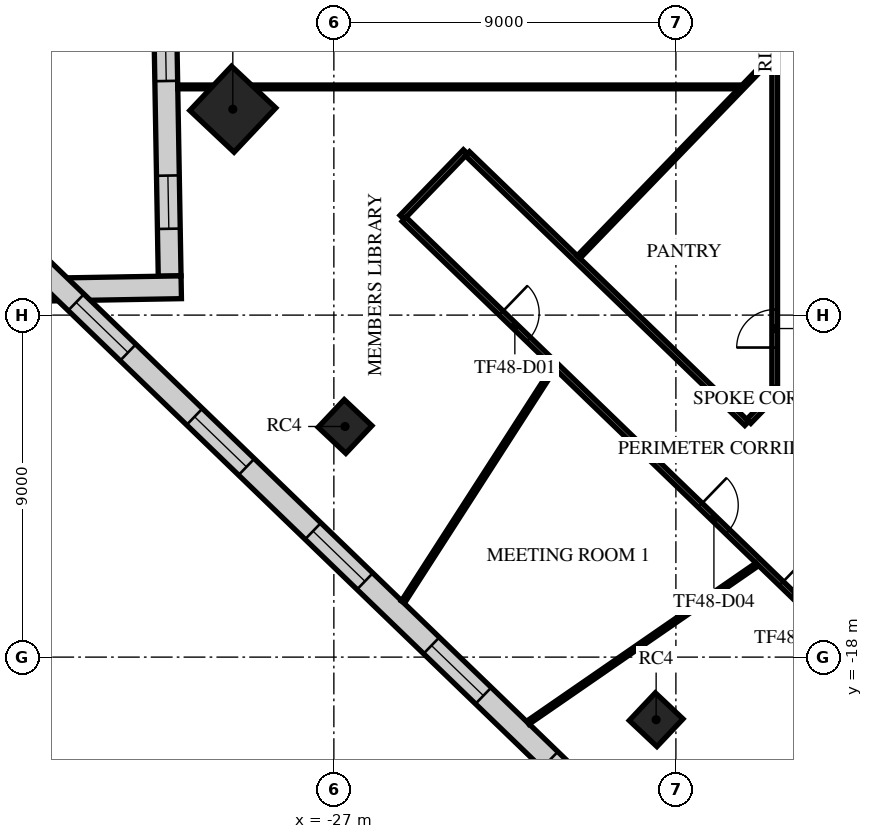
"""IFC4 building model, lengths in metres.
Left out: names, types, materials, properties, quantities, classifications, styles, units other than length and angle.
Written with IfcOpenShell. Run it as: python <this file> out.ifc"""

import sys

from ifc_helpers import new_model, si_unit, direction, frame, frame_2d, origin, origin_2d, place, context, subcontext, project, spatial, rectangle, extrude, element, fill, save


model = new_model("IFC4")
c1 = context("Model", 3, precision=1e-05, world=origin(), true_north=direction((0.0, 1.0)))
c2 = subcontext(c1, "Body", "Model", "MODEL_VIEW")
j1 = project(units=[si_unit("LENGTHUNIT", "METRE"), si_unit("PLANEANGLEUNIT", "RADIAN")], contexts=[c1])
p1 = place(None, origin())
s1 = spatial("IfcSite", under=j1, at=p1, CompositionType="ELEMENT")
p2 = place(p1, origin())
s2 = spatial("IfcBuilding", under=s1, at=p2, CompositionType="ELEMENT")
p3 = place(p2, frame((0.0, 0.0, 205.3)))
s3 = spatial("IfcBuildingStorey", under=s2, at=p3, CompositionType="ELEMENT", Elevation=205.3)
p4 = place(p3, frame((-29.659, -3.582, 0.0), z_axis=(0.0, 0.0, 1.0), x_axis=(0.685916152371, 0.727680583715, 0.0)))
e1 = element("IfcColumn", 1, at=p4, inside=s3, PredefinedType="COLUMN", context=c2, shape_type="SweptSolid", body=[
    extrude(rectangle(XDim=1.6, YDim=1.6, at=origin_2d()), origin(), (0.0, 0.0, 1.0), 4.0),
])
for number, where, z_axis, x_axis in (
    (2, (-26.706, -11.931, 0.0), (0.0, 0.0, 1.0), (0.686, 0.728, 0.0)),
    (3, (-18.52, -19.647, 0.0), (0.0, 0.0, 1.0), (0.686, 0.728, 0.0)),
):
    element("IfcColumn", number, at=place(p3, frame(where, z_axis=z_axis, x_axis=x_axis)), inside=s3, PredefinedType="COLUMN", context=c2, shape_type="SweptSolid", body=[
        extrude(rectangle(XDim=1.0, YDim=1.0, at=origin_2d()), origin(), (0.0, 0.0, 1.0), 4.0),
    ])
p5 = place(p3, frame((-31.457, -0.196, 0.0), z_axis=(0.0, 0.0, 1.0), x_axis=(0.017451978485, -0.999847702626, 0.0)))
e4 = element("IfcWall", 4, at=p5, inside=s3, PredefinedType="STANDARD", context=c2, shape_type="SweptSolid", body=[
    extrude(rectangle(XDim=7.778, YDim=0.6, at=frame_2d((3.889, 0.0))), origin(), (0.0, 0.0, 1.0), 3.62),
])
p6 = place(p5, frame((1.244, 0.0, 0.9)))
e5 = element("IfcOpeningElement", 5, at=p6, cuts=e4, PredefinedType="OPENING", context=c2, shape_type="SweptSolid", body=[
    extrude(rectangle(XDim=1.4, YDim=2.1, at=frame_2d((0.7, 1.05))), frame((0.0, 0.31, 0.0), z_axis=(0.0, -1.0, 0.0), x_axis=(1.0, 0.0, 0.0)), (0.0, 0.0, 1.0), 0.62),
])
p7 = place(p5, frame((5.134, 0.0, 0.9)))
e6 = element("IfcOpeningElement", 6, at=p7, cuts=e4, PredefinedType="OPENING", context=c2, shape_type="SweptSolid", body=[
    extrude(rectangle(XDim=1.4, YDim=2.1, at=frame_2d((0.7, 1.05))), frame((0.0, 0.31, 0.0), z_axis=(0.0, -1.0, 0.0), x_axis=(1.0, 0.0, 0.0)), (0.0, 0.0, 1.0), 0.62),
])
p8 = place(p3, frame((-31.016, -8.267, 0.0), z_axis=(0.0, 0.0, 1.0), x_axis=(-0.999847642189, -0.017455440681, 0.0)))
e7 = element("IfcWall", 7, at=p8, inside=s3, PredefinedType="STANDARD", context=c2, shape_type="SweptSolid", body=[
    extrude(rectangle(XDim=3.846, YDim=0.6, at=frame_2d((1.923, 0.0))), origin(), (0.0, 0.0, 1.0), 3.62),
])
p9 = place(p3, frame((-34.658, -7.819, 0.0), z_axis=(0.0, 0.0, 1.0), x_axis=(0.719340729741, -0.694657408034, 0.0)))
e8 = element("IfcWall", 8, at=p9, inside=s3, PredefinedType="STANDARD", context=c2, shape_type="SweptSolid", body=[
    extrude(rectangle(XDim=39.0, YDim=0.6, at=frame_2d((19.5, 0.0))), origin(), (0.0, 0.0, 1.0), 3.62),
])
p10 = place(p9, frame((1.217, 0.0, 0.9)))
e9 = element("IfcOpeningElement", 9, at=p10, cuts=e8, PredefinedType="OPENING", context=c2, shape_type="SweptSolid", body=[
    extrude(rectangle(XDim=1.9, YDim=2.1, at=frame_2d((0.95, 1.05))), frame((0.0, 0.31, 0.0), z_axis=(0.0, -1.0, 0.0), x_axis=(1.0, 0.0, 0.0)), (0.0, 0.0, 1.0), 0.62),
])
p11 = place(p9, frame((5.55, 0.0, 0.9)))
e10 = element("IfcOpeningElement", 10, at=p11, cuts=e8, PredefinedType="OPENING", context=c2, shape_type="SweptSolid", body=[
    extrude(rectangle(XDim=1.9, YDim=2.1, at=frame_2d((0.95, 1.05))), frame((0.0, 0.31, 0.0), z_axis=(0.0, -1.0, 0.0), x_axis=(1.0, 0.0, 0.0)), (0.0, 0.0, 1.0), 0.62),
])
p12 = place(p9, frame((9.883, 0.0, 0.9)))
e11 = element("IfcOpeningElement", 11, at=p12, cuts=e8, PredefinedType="OPENING", context=c2, shape_type="SweptSolid", body=[
    extrude(rectangle(XDim=1.9, YDim=2.1, at=frame_2d((0.95, 1.05))), frame((0.0, 0.31, 0.0), z_axis=(0.0, -1.0, 0.0), x_axis=(1.0, 0.0, 0.0)), (0.0, 0.0, 1.0), 0.62),
])
p13 = place(p9, frame((14.217, 0.0, 0.9)))
e12 = element("IfcOpeningElement", 12, at=p13, cuts=e8, PredefinedType="OPENING", context=c2, shape_type="SweptSolid", body=[
    extrude(rectangle(XDim=1.9, YDim=2.1, at=frame_2d((0.95, 1.05))), frame((0.0, 0.31, 0.0), z_axis=(0.0, -1.0, 0.0), x_axis=(1.0, 0.0, 0.0)), (0.0, 0.0, 1.0), 0.62),
])
p14 = place(p9, frame((18.55, 0.0, 0.9)))
e13 = element("IfcOpeningElement", 13, at=p14, cuts=e8, PredefinedType="OPENING", context=c2, shape_type="SweptSolid", body=[
    extrude(rectangle(XDim=1.9, YDim=2.1, at=frame_2d((0.95, 1.05))), frame((0.0, 0.31, 0.0), z_axis=(0.0, -1.0, 0.0), x_axis=(1.0, 0.0, 0.0)), (0.0, 0.0, 1.0), 0.62),
])
p15 = place(p9, frame((22.883, 0.0, 0.9)))
e14 = element("IfcOpeningElement", 14, at=p15, cuts=e8, PredefinedType="OPENING", context=c2, shape_type="SweptSolid", body=[
    extrude(rectangle(XDim=1.9, YDim=2.1, at=frame_2d((0.95, 1.05))), frame((0.0, 0.31, 0.0), z_axis=(0.0, -1.0, 0.0), x_axis=(1.0, 0.0, 0.0)), (0.0, 0.0, 1.0), 0.62),
])
p16 = place(p9, frame((27.217, 0.0, 0.9)))
e15 = element("IfcOpeningElement", 15, at=p16, cuts=e8, PredefinedType="OPENING", context=c2, shape_type="SweptSolid", body=[
    extrude(rectangle(XDim=1.9, YDim=2.1, at=frame_2d((0.95, 1.05))), frame((0.0, 0.31, 0.0), z_axis=(0.0, -1.0, 0.0), x_axis=(1.0, 0.0, 0.0)), (0.0, 0.0, 1.0), 0.62),
])
p17 = place(p9, frame((31.55, 0.0, 0.9)))
e16 = element("IfcOpeningElement", 16, at=p17, cuts=e8, PredefinedType="OPENING", context=c2, shape_type="SweptSolid", body=[
    extrude(rectangle(XDim=1.9, YDim=2.1, at=frame_2d((0.95, 1.05))), frame((0.0, 0.31, 0.0), z_axis=(0.0, -1.0, 0.0), x_axis=(1.0, 0.0, 0.0)), (0.0, 0.0, 1.0), 0.62),
])
p18 = place(p9, frame((35.883, 0.0, 0.9)))
e17 = element("IfcOpeningElement", 17, at=p18, cuts=e8, PredefinedType="OPENING", context=c2, shape_type="SweptSolid", body=[
    extrude(rectangle(XDim=1.9, YDim=2.1, at=frame_2d((0.95, 1.05))), frame((0.0, 0.31, 0.0), z_axis=(0.0, -1.0, 0.0), x_axis=(1.0, 0.0, 0.0)), (0.0, 0.0, 1.0), 0.62),
])
p19 = place(p3, frame((-25.205, -6.427, 0.0), z_axis=(0.0, 0.0, 1.0), x_axis=(0.694688923552, 0.719310294305, 0.0)))
e18 = element("IfcWall", 18, at=p19, inside=s3, PredefinedType="PARTITIONING", context=c2, shape_type="SweptSolid", body=[
    extrude(rectangle(XDim=2.4, YDim=0.15, at=frame_2d((1.2, 0.0))), origin(), (0.0, 0.0, 1.0), 3.62),
])
p20 = place(p3, frame((-25.151, -6.479, 0.0), z_axis=(0.0, 0.0, 1.0), x_axis=(0.719341269489, -0.694656849106, 0.0)))
e19 = element("IfcWall", 19, at=p20, inside=s3, PredefinedType="PARTITIONING", context=c2, shape_type="SweptSolid", body=[
    extrude(rectangle(XDim=27.258, YDim=0.15, at=frame_2d((13.629, 0.0))), origin(), (0.0, 0.0, 1.0), 3.17),
])
p21 = place(p20, frame((3.55, 0.0, 0.0)))
e20 = element("IfcOpeningElement", 20, at=p21, cuts=e19, PredefinedType="OPENING", context=c2, shape_type="SweptSolid", body=[
    extrude(rectangle(XDim=1.0, YDim=2.1, at=frame_2d((0.5, 1.05))), frame((0.0, 0.085, 0.0), z_axis=(0.0, -1.0, 0.0), x_axis=(1.0, 0.0, 0.0)), (0.0, 0.0, 1.0), 0.17),
])
p22 = place(p20, frame((10.832, 0.0, 0.0)))
e21 = element("IfcOpeningElement", 21, at=p22, cuts=e19, PredefinedType="OPENING", context=c2, shape_type="SweptSolid", body=[
    extrude(rectangle(XDim=1.0, YDim=2.1, at=frame_2d((0.5, 1.05))), frame((0.0, 0.085, 0.0), z_axis=(0.0, -1.0, 0.0), x_axis=(1.0, 0.0, 0.0)), (0.0, 0.0, 1.0), 0.17),
])
p23 = place(p20, frame((13.797, 0.0, 0.0)))
e22 = element("IfcOpeningElement", 22, at=p23, cuts=e19, PredefinedType="OPENING", context=c2, shape_type="SweptSolid", body=[
    extrude(rectangle(XDim=1.0, YDim=2.1, at=frame_2d((0.5, 1.05))), frame((0.0, 0.085, 0.0), z_axis=(0.0, -1.0, 0.0), x_axis=(1.0, 0.0, 0.0)), (0.0, 0.0, 1.0), 0.17),
])
p24 = place(p3, frame((-23.484, -4.753, 0.0), z_axis=(0.0, 0.0, 1.0), x_axis=(0.719330221059, -0.694668289956, 0.0)))
e23 = element("IfcWall", 23, at=p24, inside=s3, PredefinedType="PARTITIONING", context=c2, shape_type="SweptSolid", body=[
    extrude(rectangle(XDim=10.216, YDim=0.15, at=frame_2d((5.108, 0.0))), origin(), (0.0, 0.0, 1.0), 3.17),
])
p25 = place(p3, frame((-16.083, -11.796, 0.0), z_axis=(0.0, 0.0, 1.0), x_axis=(0.694957895629, 0.719050431682, 0.0)))
e24 = element("IfcWall", 24, at=p25, inside=s3, PredefinedType="PARTITIONING", context=c2, shape_type="SweptSolid", body=[
    extrude(rectangle(XDim=0.983, YDim=0.15, at=frame_2d((0.491, 0.0))), origin(), (0.0, 0.0, 1.0), 3.17),
])
p26 = place(p3, frame((-15.4, -10.903, 0.0), z_axis=(0.0, 0.0, 1.0), x_axis=(0.0, 1.0, 0.0)))
e25 = element("IfcWall", 25, at=p26, inside=s3, PredefinedType="PARTITIONING", context=c2, shape_type="SweptSolid", body=[
    extrude(rectangle(XDim=19.403, YDim=0.15, at=frame_2d((9.702, 0.0))), origin(), (0.0, 0.0, 1.0), 3.17),
])
p27 = place(p26, frame((15.032, 0.0, 0.0)))
e26 = element("IfcOpeningElement", 26, at=p27, cuts=e25, PredefinedType="OPENING", context=c2, shape_type="SweptSolid", body=[
    extrude(rectangle(XDim=1.0, YDim=2.1, at=frame_2d((0.5, 1.05))), frame((0.0, 0.085, 0.0), z_axis=(0.0, -1.0, 0.0), x_axis=(1.0, 0.0, 0.0)), (0.0, 0.0, 1.0), 0.17),
])
p28 = place(p26, frame((1.05, 0.0, 0.0)))
e27 = element("IfcOpeningElement", 27, at=p28, cuts=e25, PredefinedType="OPENING", context=c2, shape_type="SweptSolid", body=[
    extrude(rectangle(XDim=1.0, YDim=2.1, at=frame_2d((0.5, 1.05))), frame((0.0, 0.085, 0.0), z_axis=(0.0, -1.0, 0.0), x_axis=(1.0, 0.0, 0.0)), (0.0, 0.0, 1.0), 0.17),
])
p29 = place(p3, frame((-31.106, -2.995, 0.0), z_axis=(0.0, 0.0, 1.0), x_axis=(1.0, 0.0, 0.0)))
e28 = element("IfcWall", 28, at=p29, inside=s3, PredefinedType="PARTITIONING", context=c2, shape_type="SweptSolid", body=[
    extrude(rectangle(XDim=0.901, YDim=0.1, at=frame_2d((0.45, 0.0))), origin(), (0.0, 0.0, 1.0), 3.62),
])
p30 = place(p3, frame((-29.115, -2.995, 0.0), z_axis=(0.0, 0.0, 1.0), x_axis=(1.0, 0.0, 0.0)))
e29 = element("IfcWall", 29, at=p30, inside=s3, PredefinedType="PARTITIONING", context=c2, shape_type="SweptSolid", body=[
    extrude(rectangle(XDim=12.762, YDim=0.1, at=frame_2d((6.381, 0.0))), origin(), (0.0, 0.0, 1.0), 3.05),
])
p31 = place(p3, frame((-25.182, -16.55, 0.0), z_axis=(0.0, 0.0, 1.0), x_axis=(0.541323767844, 0.84081423535, 0.0)))
e30 = element("IfcWall", 30, at=p31, inside=s3, PredefinedType="PARTITIONING", context=c2, shape_type="SweptSolid", body=[
    extrude(rectangle(XDim=7.321, YDim=0.1, at=frame_2d((3.661, 0.0))), origin(), (0.0, 0.0, 1.0), 2.97),
])
p32 = place(p3, frame((-21.894, -19.725, 0.0), z_axis=(0.0, 0.0, 1.0), x_axis=(0.822893560883, 0.568195553887, 0.0)))
e31 = element("IfcWall", 31, at=p32, inside=s3, PredefinedType="PARTITIONING", context=c2, shape_type="SweptSolid", body=[
    extrude(rectangle(XDim=7.324, YDim=0.1, at=frame_2d((3.662, 0.0))), origin(), (0.0, 0.0, 1.0), 2.97),
])
p33 = place(p3, frame((-20.56, -7.472, 0.0), z_axis=(0.0, 0.0, 1.0), x_axis=(0.694721601458, 0.719278733502, 0.0)))
e32 = element("IfcWall", 32, at=p33, inside=s3, PredefinedType="PARTITIONING", context=c2, shape_type="SweptSolid", body=[
    extrude(rectangle(XDim=7.267, YDim=0.1, at=frame_2d((3.634, 0.0))), origin(), (0.0, 0.0, 1.0), 3.17),
])
p34 = place(p6, origin())
e33 = element("IfcWindow", 33, at=p34, inside=s3, PartitioningType="SINGLE_PANEL", PredefinedType="WINDOW", context=c2, shape_type="SweptSolid", body=[
    extrude(rectangle(XDim=1.4, YDim=2.1, at=frame_2d((0.7, 1.05))), frame((0.0, 0.03, 0.0), z_axis=(0.0, -1.0, 0.0), x_axis=(1.0, 0.0, 0.0)), (0.0, 0.0, 1.0), 0.06),
])
fill(e5, e33)
p35 = place(p7, origin())
e34 = element("IfcWindow", 34, at=p35, inside=s3, PartitioningType="SINGLE_PANEL", PredefinedType="WINDOW", context=c2, shape_type="SweptSolid", body=[
    extrude(rectangle(XDim=1.4, YDim=2.1, at=frame_2d((0.7, 1.05))), frame((0.0, 0.03, 0.0), z_axis=(0.0, -1.0, 0.0), x_axis=(1.0, 0.0, 0.0)), (0.0, 0.0, 1.0), 0.06),
])
fill(e6, e34)
p36 = place(p10, origin())
e35 = element("IfcWindow", 35, at=p36, inside=s3, PartitioningType="SINGLE_PANEL", PredefinedType="WINDOW", context=c2, shape_type="SweptSolid", body=[
    extrude(rectangle(XDim=1.9, YDim=2.1, at=frame_2d((0.95, 1.05))), frame((0.0, 0.03, 0.0), z_axis=(0.0, -1.0, 0.0), x_axis=(1.0, 0.0, 0.0)), (0.0, 0.0, 1.0), 0.06),
])
fill(e9, e35)
p37 = place(p11, origin())
e36 = element("IfcWindow", 36, at=p37, inside=s3, PartitioningType="SINGLE_PANEL", PredefinedType="WINDOW", context=c2, shape_type="SweptSolid", body=[
    extrude(rectangle(XDim=1.9, YDim=2.1, at=frame_2d((0.95, 1.05))), frame((0.0, 0.03, 0.0), z_axis=(0.0, -1.0, 0.0), x_axis=(1.0, 0.0, 0.0)), (0.0, 0.0, 1.0), 0.06),
])
fill(e10, e36)
p38 = place(p12, origin())
e37 = element("IfcWindow", 37, at=p38, inside=s3, PartitioningType="SINGLE_PANEL", PredefinedType="WINDOW", context=c2, shape_type="SweptSolid", body=[
    extrude(rectangle(XDim=1.9, YDim=2.1, at=frame_2d((0.95, 1.05))), frame((0.0, 0.03, 0.0), z_axis=(0.0, -1.0, 0.0), x_axis=(1.0, 0.0, 0.0)), (0.0, 0.0, 1.0), 0.06),
])
fill(e11, e37)
p39 = place(p13, origin())
e38 = element("IfcWindow", 38, at=p39, inside=s3, PartitioningType="SINGLE_PANEL", PredefinedType="WINDOW", context=c2, shape_type="SweptSolid", body=[
    extrude(rectangle(XDim=1.9, YDim=2.1, at=frame_2d((0.95, 1.05))), frame((0.0, 0.03, 0.0), z_axis=(0.0, -1.0, 0.0), x_axis=(1.0, 0.0, 0.0)), (0.0, 0.0, 1.0), 0.06),
])
fill(e12, e38)
p40 = place(p21, frame((1.0, 0.0, 0.0), z_axis=(0.0, 0.0, 1.0), x_axis=(-1.0, 0.0, 0.0)))
e39 = element("IfcDoor", 39, at=p40, inside=s3, OperationType="SINGLE_SWING_LEFT", PredefinedType="DOOR", context=c2, shape_type="SweptSolid", body=[
    extrude(rectangle(XDim=1.0, YDim=2.1, at=frame_2d((0.5, 1.05))), frame((0.0, 0.025, 0.0), z_axis=(0.0, -1.0, 0.0), x_axis=(1.0, 0.0, 0.0)), (0.0, 0.0, 1.0), 0.05),
])
fill(e20, e39)
p41 = place(p22, frame((1.0, 0.0, 0.0), z_axis=(0.0, 0.0, 1.0), x_axis=(-1.0, 0.0, 0.0)))
e40 = element("IfcDoor", 40, at=p41, inside=s3, OperationType="SINGLE_SWING_RIGHT", PredefinedType="DOOR", context=c2, shape_type="SweptSolid", body=[
    extrude(rectangle(XDim=1.0, YDim=2.1, at=frame_2d((0.5, 1.05))), frame((0.0, 0.025, 0.0), z_axis=(0.0, -1.0, 0.0), x_axis=(1.0, 0.0, 0.0)), (0.0, 0.0, 1.0), 0.05),
])
fill(e21, e40)
p42 = place(p28, origin())
e41 = element("IfcDoor", 41, at=p42, inside=s3, OperationType="SINGLE_SWING_RIGHT", PredefinedType="DOOR", context=c2, shape_type="SweptSolid", body=[
    extrude(rectangle(XDim=1.0, YDim=2.1, at=frame_2d((0.5, 1.05))), frame((0.0, 0.025, 0.0), z_axis=(0.0, -1.0, 0.0), x_axis=(1.0, 0.0, 0.0)), (0.0, 0.0, 1.0), 0.05),
])
fill(e27, e41)
p43 = place(p23, frame((1.0, 0.0, 0.0), z_axis=(0.0, 0.0, 1.0), x_axis=(-1.0, 0.0, 0.0)))
e42 = element("IfcDoor", 42, at=p43, inside=s3, OperationType="SINGLE_SWING_RIGHT", PredefinedType="DOOR", context=c2, shape_type="SweptSolid", body=[
    extrude(rectangle(XDim=1.0, YDim=2.1, at=frame_2d((0.5, 1.05))), frame((0.0, 0.025, 0.0), z_axis=(0.0, -1.0, 0.0), x_axis=(1.0, 0.0, 0.0)), (0.0, 0.0, 1.0), 0.05),
])
fill(e22, e42)
save(model, sys.argv[1])
